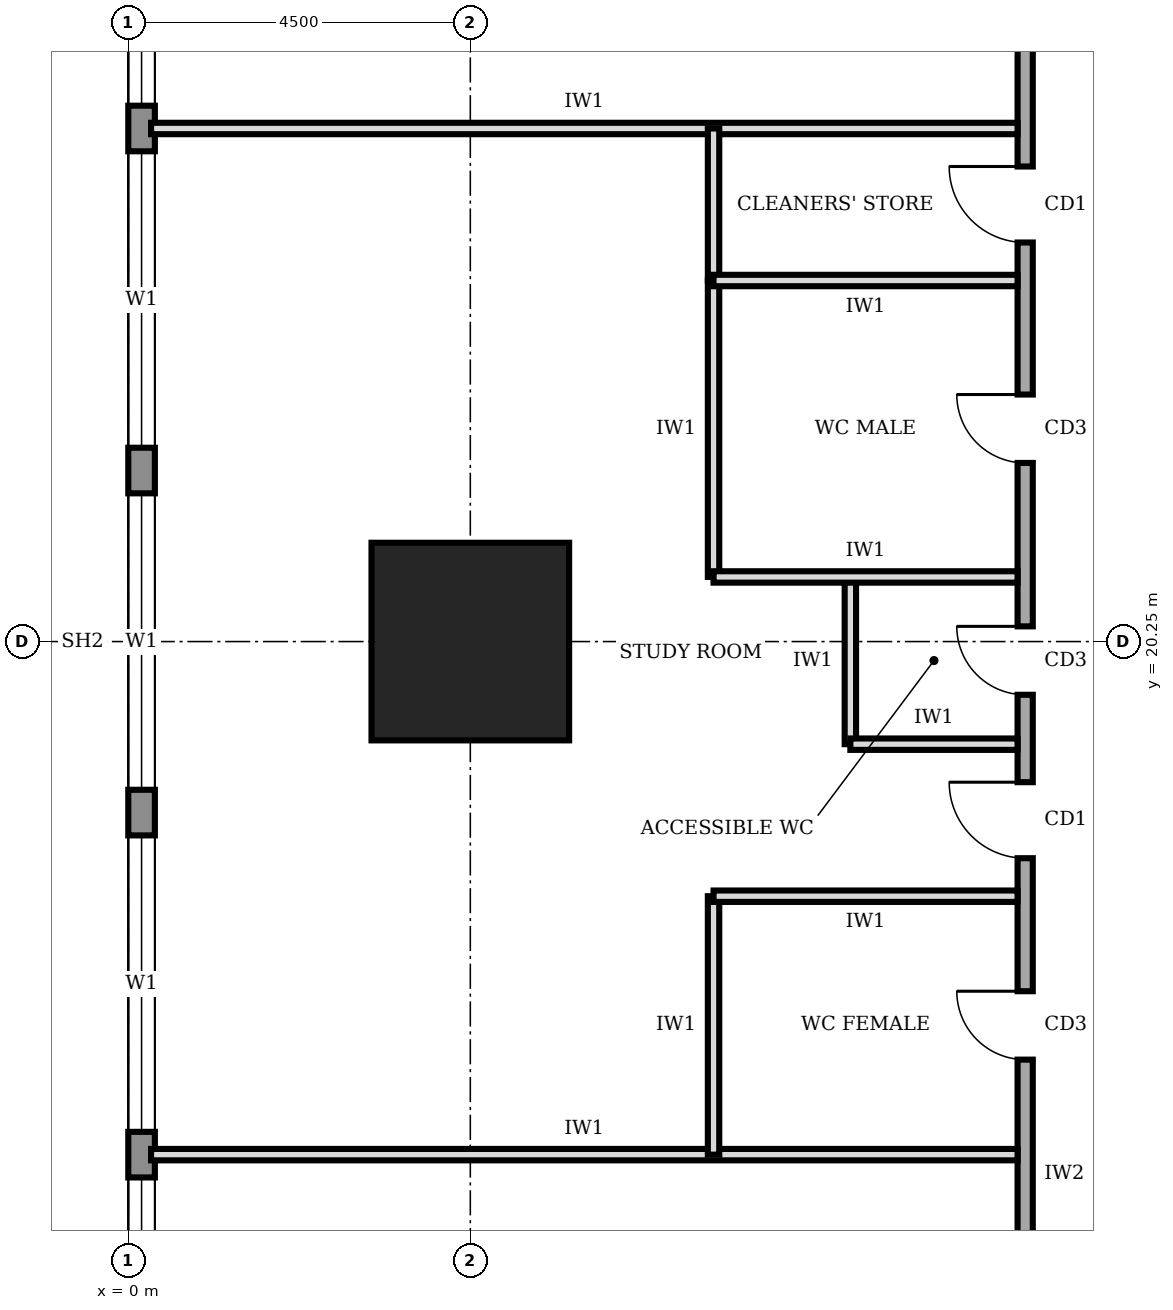
"""IFC4 building model, lengths in metres.
Left out: names, types, materials, properties, quantities, classifications, styles, units other than length and angle.
Written with IfcOpenShell. Run it as: python <this file> out.ifc"""

import sys

from ifc_helpers import new_model, si_unit, direction, frame, frame_2d, origin, origin_2d, place, context, subcontext, project, spatial, rectangle, extrude, element, fill, save


model = new_model("IFC4")
c1 = context("Model", 3, precision=1e-05, world=origin(), true_north=direction((0.0, 1.0)))
c2 = subcontext(c1, "Body", "Model", "MODEL_VIEW")
j1 = project(units=[si_unit("LENGTHUNIT", "METRE"), si_unit("PLANEANGLEUNIT", "RADIAN")], contexts=[c1])
p1 = place(None, origin())
s1 = spatial("IfcSite", under=j1, at=p1, CompositionType="ELEMENT")
p2 = place(p1, origin())
s2 = spatial("IfcBuilding", under=s1, at=p2, CompositionType="ELEMENT")
p3 = place(p2, frame((0.0, 0.0, 117.0)))
s3 = spatial("IfcBuildingStorey", under=s2, at=p3, CompositionType="ELEMENT", Elevation=117.0)
p4 = place(p3, frame((4.5, 20.25, 0.0), z_axis=(0.0, 0.0, 1.0), x_axis=(1.0, 0.0, 0.0)))
e1 = element("IfcColumn", 1, at=p4, inside=s3, PredefinedType="COLUMN", context=c2, shape_type="SweptSolid", body=[
    extrude(rectangle(XDim=2.6, YDim=2.6, at=origin_2d()), origin(), (0.0, 0.0, 1.0), 4.0),
])
p5 = place(p3, frame((0.175, 35.98, 0.0), z_axis=(0.0, 0.0, 1.0), x_axis=(0.0, -1.0, 0.0)))
e2 = element("IfcWall", 2, at=p5, inside=s3, PredefinedType="STANDARD", context=c2, shape_type="SweptSolid", body=[
    extrude(rectangle(XDim=31.46, YDim=0.35, at=frame_2d((15.73, 0.0))), origin(), (0.0, 0.0, 1.0), 3.75),
])
p6 = place(p5, frame((27.21, 0.0, 0.9)))
e3 = element("IfcOpeningElement", 3, at=p6, cuts=e2, PredefinedType="OPENING", context=c2, shape_type="SweptSolid", body=[
    extrude(rectangle(XDim=3.9, YDim=2.2, at=frame_2d((1.95, 1.1))), frame((0.0, 0.185, 0.0), z_axis=(0.0, -1.0, 0.0), x_axis=(1.0, 0.0, 0.0)), (0.0, 0.0, 1.0), 0.37),
])
p7 = place(p5, frame((22.78, 0.0, 0.9)))
e4 = element("IfcOpeningElement", 4, at=p7, cuts=e2, PredefinedType="OPENING", context=c2, shape_type="SweptSolid", body=[
    extrude(rectangle(XDim=3.9, YDim=2.2, at=frame_2d((1.95, 1.1))), frame((0.0, 0.185, 0.0), z_axis=(0.0, -1.0, 0.0), x_axis=(1.0, 0.0, 0.0)), (0.0, 0.0, 1.0), 0.37),
])
p8 = place(p5, frame((18.28, 0.0, 0.9)))
e5 = element("IfcOpeningElement", 5, at=p8, cuts=e2, PredefinedType="OPENING", context=c2, shape_type="SweptSolid", body=[
    extrude(rectangle(XDim=3.9, YDim=2.2, at=frame_2d((1.95, 1.1))), frame((0.0, 0.185, 0.0), z_axis=(0.0, -1.0, 0.0), x_axis=(1.0, 0.0, 0.0)), (0.0, 0.0, 1.0), 0.37),
])
p9 = place(p5, frame((13.78, 0.0, 0.9)))
e6 = element("IfcOpeningElement", 6, at=p9, cuts=e2, PredefinedType="OPENING", context=c2, shape_type="SweptSolid", body=[
    extrude(rectangle(XDim=3.9, YDim=2.2, at=frame_2d((1.95, 1.1))), frame((0.0, 0.185, 0.0), z_axis=(0.0, -1.0, 0.0), x_axis=(1.0, 0.0, 0.0)), (0.0, 0.0, 1.0), 0.37),
])
p10 = place(p5, frame((9.28, 0.0, 0.9)))
e7 = element("IfcOpeningElement", 7, at=p10, cuts=e2, PredefinedType="OPENING", context=c2, shape_type="SweptSolid", body=[
    extrude(rectangle(XDim=3.9, YDim=2.2, at=frame_2d((1.95, 1.1))), frame((0.0, 0.185, 0.0), z_axis=(0.0, -1.0, 0.0), x_axis=(1.0, 0.0, 0.0)), (0.0, 0.0, 1.0), 0.37),
])
p11 = place(p5, frame((4.78, 0.0, 0.9)))
e8 = element("IfcOpeningElement", 8, at=p11, cuts=e2, PredefinedType="OPENING", context=c2, shape_type="SweptSolid", body=[
    extrude(rectangle(XDim=3.9, YDim=2.2, at=frame_2d((1.95, 1.1))), frame((0.0, 0.185, 0.0), z_axis=(0.0, -1.0, 0.0), x_axis=(1.0, 0.0, 0.0)), (0.0, 0.0, 1.0), 0.37),
])
p12 = place(p3, frame((11.8, 32.05, 0.0), z_axis=(0.0, 0.0, 1.0), x_axis=(0.0, -1.0, 0.0)))
e9 = element("IfcWall", 9, at=p12, inside=s3, PredefinedType="SOLIDWALL", context=c2, shape_type="SweptSolid", body=[
    extrude(rectangle(XDim=23.05, YDim=0.2, at=frame_2d((11.525, 0.0))), origin(), (0.0, 0.0, 1.0), 3.75),
])
p13 = place(p12, frame((20.3, 0.0, 0.0)))
e10 = element("IfcOpeningElement", 10, at=p13, cuts=e9, PredefinedType="OPENING", context=c2, shape_type="SweptSolid", body=[
    extrude(rectangle(XDim=1.0, YDim=2.1, at=frame_2d((0.5, 1.05))), frame((0.0, 0.11, 0.0), z_axis=(0.0, -1.0, 0.0), x_axis=(1.0, 0.0, 0.0)), (0.0, 0.0, 1.0), 0.22),
])
p14 = place(p12, frame((16.4, 0.0, 0.0)))
e11 = element("IfcOpeningElement", 11, at=p14, cuts=e9, PredefinedType="OPENING", context=c2, shape_type="SweptSolid", body=[
    extrude(rectangle(XDim=0.9, YDim=2.1, at=frame_2d((0.45, 1.05))), frame((0.0, 0.11, 0.0), z_axis=(0.0, -1.0, 0.0), x_axis=(1.0, 0.0, 0.0)), (0.0, 0.0, 1.0), 0.22),
])
p15 = place(p12, frame((11.6, 0.0, 0.0)))
e12 = element("IfcOpeningElement", 12, at=p15, cuts=e9, PredefinedType="OPENING", context=c2, shape_type="SweptSolid", body=[
    extrude(rectangle(XDim=0.9, YDim=2.1, at=frame_2d((0.45, 1.05))), frame((0.0, 0.11, 0.0), z_axis=(0.0, -1.0, 0.0), x_axis=(1.0, 0.0, 0.0)), (0.0, 0.0, 1.0), 0.22),
])
p16 = place(p12, frame((8.55, 0.0, 0.0)))
e13 = element("IfcOpeningElement", 13, at=p16, cuts=e9, PredefinedType="OPENING", context=c2, shape_type="SweptSolid", body=[
    extrude(rectangle(XDim=0.9, YDim=2.1, at=frame_2d((0.45, 1.05))), frame((0.0, 0.11, 0.0), z_axis=(0.0, -1.0, 0.0), x_axis=(1.0, 0.0, 0.0)), (0.0, 0.0, 1.0), 0.22),
])
p17 = place(p12, frame((5.55, 0.0, 0.0)))
e14 = element("IfcOpeningElement", 14, at=p17, cuts=e9, PredefinedType="OPENING", context=c2, shape_type="SweptSolid", body=[
    extrude(rectangle(XDim=1.0, YDim=2.1, at=frame_2d((0.5, 1.05))), frame((0.0, 0.11, 0.0), z_axis=(0.0, -1.0, 0.0), x_axis=(1.0, 0.0, 0.0)), (0.0, 0.0, 1.0), 0.22),
])
p18 = place(p12, frame((13.65, 0.0, 0.0)))
e15 = element("IfcOpeningElement", 15, at=p18, cuts=e9, PredefinedType="OPENING", context=c2, shape_type="SweptSolid", body=[
    extrude(rectangle(XDim=1.0, YDim=2.1, at=frame_2d((0.5, 1.05))), frame((0.0, 0.11, 0.0), z_axis=(0.0, -1.0, 0.0), x_axis=(1.0, 0.0, 0.0)), (0.0, 0.0, 1.0), 0.22),
])
p19 = place(p12, frame((1.925, 0.0, 0.0)))
e16 = element("IfcOpeningElement", 16, at=p19, cuts=e9, PredefinedType="OPENING", context=c2, shape_type="SweptSolid", body=[
    extrude(rectangle(XDim=1.0, YDim=2.1, at=frame_2d((0.5, 1.05))), frame((0.0, 0.11, 0.0), z_axis=(0.0, -1.0, 0.0), x_axis=(1.0, 0.0, 0.0)), (0.0, 0.0, 1.0), 0.22),
])
for number, where, z_axis, x_axis in (
    (17, (0.3, 13.5, 0.0), (0.0, 0.0, 1.0), (1.0, 0.0, 0.0)),
    (18, (0.3, 27.0, 0.0), (0.0, 0.0, 1.0), (1.0, 0.0, 0.0)),
):
    element("IfcWall", number, at=place(p3, frame(where, z_axis=z_axis, x_axis=x_axis)), inside=s3, PredefinedType="PARTITIONING", context=c2, shape_type="SweptSolid", body=[
        extrude(rectangle(XDim=11.4, YDim=0.15, at=frame_2d((5.7, 0.0))), origin(), (0.0, 0.0, 1.0), 3.75),
    ])
p20 = place(p3, frame((11.7, 16.9, 0.0), z_axis=(0.0, 0.0, 1.0), x_axis=(-1.0, 0.0, 0.0)))
e19 = element("IfcWall", 19, at=p20, inside=s3, PredefinedType="PARTITIONING", context=c2, shape_type="SweptSolid", body=[
    extrude(rectangle(XDim=4.0, YDim=0.15, at=frame_2d((2.0, 0.0))), origin(), (0.0, 0.0, 1.0), 3.75),
])
p21 = place(p3, frame((11.7, 18.9, 0.0), z_axis=(0.0, 0.0, 1.0), x_axis=(-1.0, 0.0, 0.0)))
e20 = element("IfcWall", 20, at=p21, inside=s3, PredefinedType="PARTITIONING", context=c2, shape_type="SweptSolid", body=[
    extrude(rectangle(XDim=2.2, YDim=0.15, at=frame_2d((1.1, 0.0))), origin(), (0.0, 0.0, 1.0), 3.75),
])
p22 = place(p3, frame((11.7, 21.1, 0.0), z_axis=(0.0, 0.0, 1.0), x_axis=(-1.0, 0.0, 0.0)))
e21 = element("IfcWall", 21, at=p22, inside=s3, PredefinedType="PARTITIONING", context=c2, shape_type="SweptSolid", body=[
    extrude(rectangle(XDim=4.0, YDim=0.15, at=frame_2d((2.0, 0.0))), origin(), (0.0, 0.0, 1.0), 2.85),
])
p23 = place(p3, frame((11.7, 25.0, 0.0), z_axis=(0.0, 0.0, 1.0), x_axis=(-1.0, 0.0, 0.0)))
e22 = element("IfcWall", 22, at=p23, inside=s3, PredefinedType="PARTITIONING", context=c2, shape_type="SweptSolid", body=[
    extrude(rectangle(XDim=4.0, YDim=0.15, at=frame_2d((2.0, 0.0))), origin(), (0.0, 0.0, 1.0), 3.75),
])
p24 = place(p3, frame((7.7, 13.5, 0.0), z_axis=(0.0, 0.0, 1.0), x_axis=(0.0, 1.0, 0.0)))
e23 = element("IfcWall", 23, at=p24, inside=s3, PredefinedType="PARTITIONING", context=c2, shape_type="SweptSolid", body=[
    extrude(rectangle(XDim=3.4, YDim=0.15, at=frame_2d((1.7, 0.0))), origin(), (0.0, 0.0, 1.0), 3.75),
])
p25 = place(p3, frame((9.5, 18.9, 0.0), z_axis=(0.0, 0.0, 1.0), x_axis=(0.0, 1.0, 0.0)))
e24 = element("IfcWall", 24, at=p25, inside=s3, PredefinedType="PARTITIONING", context=c2, shape_type="SweptSolid", body=[
    extrude(rectangle(XDim=2.2, YDim=0.15, at=frame_2d((1.1, 0.0))), origin(), (0.0, 0.0, 1.0), 3.75),
])
p26 = place(p3, frame((7.7, 21.1, 0.0), z_axis=(0.0, 0.0, 1.0), x_axis=(0.0, 1.0, 0.0)))
e25 = element("IfcWall", 25, at=p26, inside=s3, PredefinedType="PARTITIONING", context=c2, shape_type="SweptSolid", body=[
    extrude(rectangle(XDim=3.9, YDim=0.15, at=frame_2d((1.95, 0.0))), origin(), (0.0, 0.0, 1.0), 3.75),
])
p27 = place(p3, frame((7.7, 25.0, 0.0), z_axis=(0.0, 0.0, 1.0), x_axis=(0.0, 1.0, 0.0)))
e26 = element("IfcWall", 26, at=p27, inside=s3, PredefinedType="PARTITIONING", context=c2, shape_type="SweptSolid", body=[
    extrude(rectangle(XDim=2.0, YDim=0.15, at=frame_2d((1.0, 0.0))), origin(), (0.0, 0.0, 1.0), 3.75),
])
p28 = place(p7, origin())
e27 = element("IfcWindow", 27, at=p28, inside=s3, PartitioningType="SINGLE_PANEL", PredefinedType="WINDOW", context=c2, shape_type="SweptSolid", body=[
    extrude(rectangle(XDim=3.9, YDim=2.2, at=frame_2d((1.95, 1.1))), frame((0.0, 0.03, 0.0), z_axis=(0.0, -1.0, 0.0), x_axis=(1.0, 0.0, 0.0)), (0.0, 0.0, 1.0), 0.06),
])
fill(e4, e27)
p29 = place(p8, origin())
e28 = element("IfcWindow", 28, at=p29, inside=s3, PartitioningType="SINGLE_PANEL", PredefinedType="WINDOW", context=c2, shape_type="SweptSolid", body=[
    extrude(rectangle(XDim=3.9, YDim=2.2, at=frame_2d((1.95, 1.1))), frame((0.0, 0.03, 0.0), z_axis=(0.0, -1.0, 0.0), x_axis=(1.0, 0.0, 0.0)), (0.0, 0.0, 1.0), 0.06),
])
fill(e5, e28)
p30 = place(p9, origin())
e29 = element("IfcWindow", 29, at=p30, inside=s3, PartitioningType="SINGLE_PANEL", PredefinedType="WINDOW", context=c2, shape_type="SweptSolid", body=[
    extrude(rectangle(XDim=3.9, YDim=2.2, at=frame_2d((1.95, 1.1))), frame((0.0, 0.03, 0.0), z_axis=(0.0, -1.0, 0.0), x_axis=(1.0, 0.0, 0.0)), (0.0, 0.0, 1.0), 0.06),
])
fill(e6, e29)
p31 = place(p10, origin())
e30 = element("IfcWindow", 30, at=p31, inside=s3, PartitioningType="SINGLE_PANEL", PredefinedType="WINDOW", context=c2, shape_type="SweptSolid", body=[
    extrude(rectangle(XDim=3.9, YDim=2.2, at=frame_2d((1.95, 1.1))), frame((0.0, 0.03, 0.0), z_axis=(0.0, -1.0, 0.0), x_axis=(1.0, 0.0, 0.0)), (0.0, 0.0, 1.0), 0.06),
])
fill(e7, e30)
p32 = place(p11, origin())
e31 = element("IfcWindow", 31, at=p32, inside=s3, PartitioningType="SINGLE_PANEL", PredefinedType="WINDOW", context=c2, shape_type="SweptSolid", body=[
    extrude(rectangle(XDim=3.9, YDim=2.2, at=frame_2d((1.95, 1.1))), frame((0.0, 0.03, 0.0), z_axis=(0.0, -1.0, 0.0), x_axis=(1.0, 0.0, 0.0)), (0.0, 0.0, 1.0), 0.06),
])
fill(e8, e31)
p33 = place(p14, frame((0.9, 0.0, 0.0), z_axis=(0.0, 0.0, 1.0), x_axis=(-1.0, 0.0, 0.0)))
e32 = element("IfcDoor", 32, at=p33, inside=s3, OperationType="SINGLE_SWING_RIGHT", PredefinedType="DOOR", context=c2, shape_type="SweptSolid", body=[
    extrude(rectangle(XDim=0.9, YDim=2.1, at=frame_2d((0.45, 1.05))), frame((0.0, 0.025, 0.0), z_axis=(0.0, -1.0, 0.0), x_axis=(1.0, 0.0, 0.0)), (0.0, 0.0, 1.0), 0.05),
])
fill(e11, e32)
p34 = place(p15, frame((0.9, 0.0, 0.0), z_axis=(0.0, 0.0, 1.0), x_axis=(-1.0, 0.0, 0.0)))
e33 = element("IfcDoor", 33, at=p34, inside=s3, OperationType="SINGLE_SWING_RIGHT", PredefinedType="DOOR", context=c2, shape_type="SweptSolid", body=[
    extrude(rectangle(XDim=0.9, YDim=2.1, at=frame_2d((0.45, 1.05))), frame((0.0, 0.025, 0.0), z_axis=(0.0, -1.0, 0.0), x_axis=(1.0, 0.0, 0.0)), (0.0, 0.0, 1.0), 0.05),
])
fill(e12, e33)
p35 = place(p16, frame((0.9, 0.0, 0.0), z_axis=(0.0, 0.0, 1.0), x_axis=(-1.0, 0.0, 0.0)))
e34 = element("IfcDoor", 34, at=p35, inside=s3, OperationType="SINGLE_SWING_RIGHT", PredefinedType="DOOR", context=c2, shape_type="SweptSolid", body=[
    extrude(rectangle(XDim=0.9, YDim=2.1, at=frame_2d((0.45, 1.05))), frame((0.0, 0.025, 0.0), z_axis=(0.0, -1.0, 0.0), x_axis=(1.0, 0.0, 0.0)), (0.0, 0.0, 1.0), 0.05),
])
fill(e13, e34)
p36 = place(p17, frame((1.0, 0.0, 0.0), z_axis=(0.0, 0.0, 1.0), x_axis=(-1.0, 0.0, 0.0)))
e35 = element("IfcDoor", 35, at=p36, inside=s3, OperationType="SINGLE_SWING_RIGHT", PredefinedType="DOOR", context=c2, shape_type="SweptSolid", body=[
    extrude(rectangle(XDim=1.0, YDim=2.1, at=frame_2d((0.5, 1.05))), frame((0.0, 0.025, 0.0), z_axis=(0.0, -1.0, 0.0), x_axis=(1.0, 0.0, 0.0)), (0.0, 0.0, 1.0), 0.05),
])
fill(e14, e35)
p37 = place(p18, frame((1.0, 0.0, 0.0), z_axis=(0.0, 0.0, 1.0), x_axis=(-1.0, 0.0, 0.0)))
e36 = element("IfcDoor", 36, at=p37, inside=s3, OperationType="SINGLE_SWING_RIGHT", PredefinedType="DOOR", context=c2, shape_type="SweptSolid", body=[
    extrude(rectangle(XDim=1.0, YDim=2.1, at=frame_2d((0.5, 1.05))), frame((0.0, 0.025, 0.0), z_axis=(0.0, -1.0, 0.0), x_axis=(1.0, 0.0, 0.0)), (0.0, 0.0, 1.0), 0.05),
])
fill(e15, e36)
save(model, sys.argv[1])
